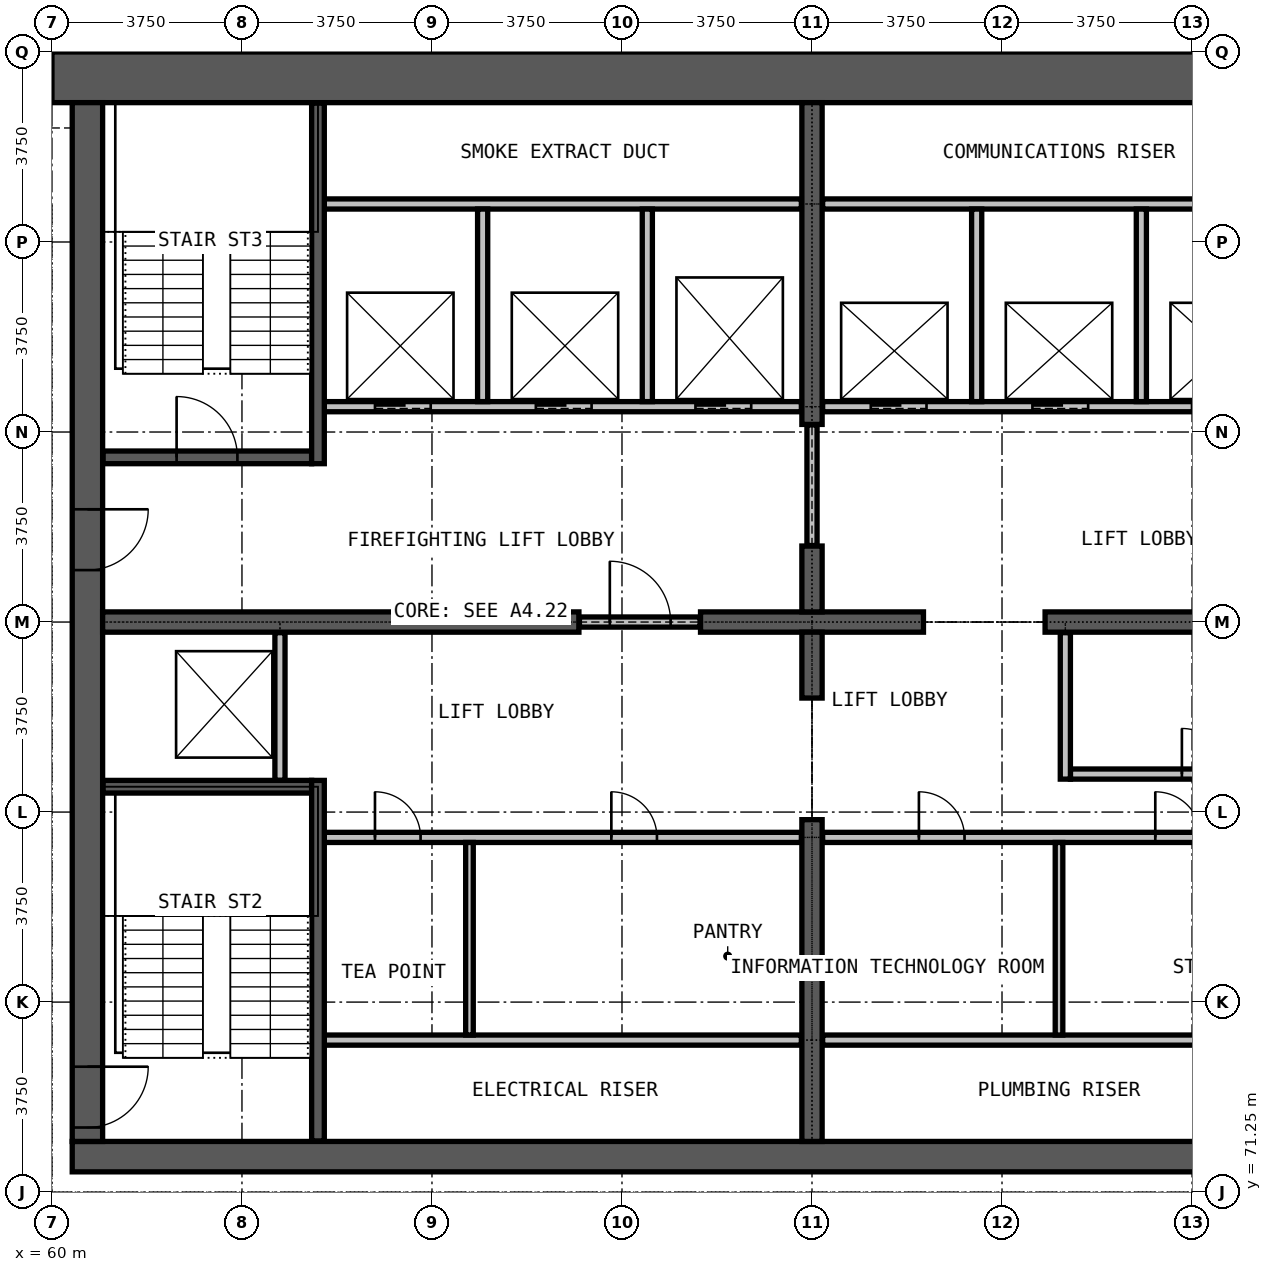
"""IFC4 building model, lengths in metres.
Left out: names, types, materials, properties, quantities, classifications, styles, units other than length and angle.
Written with IfcOpenShell. Run it as: python <this file> out.ifc"""

import sys

from ifc_helpers import new_model, si_unit, direction, frame, frame_2d, origin, place, context, subcontext, project, spatial, rectangle, extrude, element, fill, save


model = new_model("IFC4")
c1 = context("Model", 3, precision=1e-05, world=origin(), true_north=direction((0.0, 1.0)))
c2 = subcontext(c1, "Body", "Model", "MODEL_VIEW")
j1 = project(units=[si_unit("LENGTHUNIT", "METRE"), si_unit("PLANEANGLEUNIT", "RADIAN")], contexts=[c1])
p1 = place(None, origin())
s1 = spatial("IfcSite", under=j1, at=p1, CompositionType="ELEMENT")
p2 = place(p1, origin())
s2 = spatial("IfcBuilding", under=s1, at=p2, CompositionType="ELEMENT")
p3 = place(p2, frame((0.0, 0.0, 206.7)))
s3 = spatial("IfcBuildingStorey", under=s2, at=p3, CompositionType="ELEMENT", Elevation=206.7)
p4 = place(p3, frame((60.4, 71.95, 0.0), z_axis=(0.0, 0.0, 1.0), x_axis=(1.0, 0.0, 0.0)))
e1 = element("IfcWall", 1, at=p4, inside=s3, PredefinedType="SHEAR", context=c2, shape_type="SweptSolid", body=[
    extrude(rectangle(XDim=29.2, YDim=0.6, at=frame_2d((14.6, 0.0))), origin(), (0.0, 0.0, 1.0), 3.6),
])
p5 = place(p3, frame((90.0, 93.25, 0.0), z_axis=(0.0, 0.0, 1.0), x_axis=(-1.0, 0.0, 0.0)))
e2 = element("IfcWall", 2, at=p5, inside=s3, PredefinedType="SHEAR", context=c2, shape_type="SweptSolid", body=[
    extrude(rectangle(XDim=30.0, YDim=1.0, at=frame_2d((15.0, 0.0))), origin(), (0.0, 0.0, 1.0), 3.6),
])
p6 = place(p3, frame((60.7, 92.75, 0.0), z_axis=(0.0, 0.0, 1.0), x_axis=(0.0, -1.0, 0.0)))
e3 = element("IfcWall", 3, at=p6, inside=s3, PredefinedType="SHEAR", context=c2, shape_type="SweptSolid", body=[
    extrude(rectangle(XDim=20.5, YDim=0.6, at=frame_2d((10.25, 0.0))), origin(), (0.0, 0.0, 1.0), 3.6),
])
p7 = place(p6, frame((19.025, 0.0, 0.0)))
e4 = element("IfcOpeningElement", 4, at=p7, cuts=e3, PredefinedType="OPENING", context=c2, shape_type="SweptSolid", body=[
    extrude(rectangle(XDim=1.2, YDim=2.2, at=frame_2d((0.6, 1.1))), frame((0.0, 0.31, 0.0), z_axis=(0.0, -1.0, 0.0), x_axis=(1.0, 0.0, 0.0)), (0.0, 0.0, 1.0), 0.62),
])
p8 = place(p6, frame((8.025, 0.0, 0.0)))
e5 = element("IfcOpeningElement", 5, at=p8, cuts=e3, PredefinedType="OPENING", context=c2, shape_type="SweptSolid", body=[
    extrude(rectangle(XDim=1.2, YDim=2.2, at=frame_2d((0.6, 1.1))), frame((0.0, 0.31, 0.0), z_axis=(0.0, -1.0, 0.0), x_axis=(1.0, 0.0, 0.0)), (0.0, 0.0, 1.0), 0.62),
])
p9 = place(p3, frame((61.0, 82.5, 0.0), z_axis=(0.0, 0.0, 1.0), x_axis=(1.0, 0.0, 0.0)))
e6 = element("IfcWall", 6, at=p9, inside=s3, PredefinedType="SHEAR", context=c2, shape_type="SweptSolid", body=[
    extrude(rectangle(XDim=9.4, YDim=0.4, at=frame_2d((4.7, 0.0))), origin(), (0.0, 0.0, 1.0), 3.6),
])
p10 = place(p3, frame((72.8, 82.5, 0.0), z_axis=(0.0, 0.0, 1.0), x_axis=(1.0, 0.0, 0.0)))
e7 = element("IfcWall", 7, at=p10, inside=s3, PredefinedType="SHEAR", context=c2, shape_type="SweptSolid", body=[
    extrude(rectangle(XDim=4.4, YDim=0.4, at=frame_2d((2.2, 0.0))), origin(), (0.0, 0.0, 1.0), 3.6),
])
p11 = place(p3, frame((79.6, 82.5, 0.0), z_axis=(0.0, 0.0, 1.0), x_axis=(1.0, 0.0, 0.0)))
e8 = element("IfcWall", 8, at=p11, inside=s3, PredefinedType="SHEAR", context=c2, shape_type="SweptSolid", body=[
    extrude(rectangle(XDim=9.4, YDim=0.4, at=frame_2d((4.7, 0.0))), origin(), (0.0, 0.0, 1.0), 3.6),
])
p12 = place(p3, frame((75.0, 72.25, 0.0), z_axis=(0.0, 0.0, 1.0), x_axis=(0.0, 1.0, 0.0)))
e9 = element("IfcWall", 9, at=p12, inside=s3, PredefinedType="SHEAR", context=c2, shape_type="SweptSolid", body=[
    extrude(rectangle(XDim=6.35, YDim=0.4, at=frame_2d((3.175, 0.0))), origin(), (0.0, 0.0, 1.0), 3.6),
])
for number, where, z_axis, x_axis in (
    (10, (75.0, 81.0, 0.0), (0.0, 0.0, 1.0), (0.0, 1.0, 0.0)),
    (11, (75.0, 82.7, 0.0), (0.0, 0.0, 1.0), (0.0, 1.0, 0.0)),
):
    element("IfcWall", number, at=place(p3, frame(where, z_axis=z_axis, x_axis=x_axis)), inside=s3, PredefinedType="SHEAR", context=c2, shape_type="SweptSolid", body=[
        extrude(rectangle(XDim=1.3, YDim=0.4, at=frame_2d((0.65, 0.0))), origin(), (0.0, 0.0, 1.0), 3.6),
    ])
p13 = place(p3, frame((75.0, 86.4, 0.0), z_axis=(0.0, 0.0, 1.0), x_axis=(0.0, 1.0, 0.0)))
e12 = element("IfcWall", 12, at=p13, inside=s3, PredefinedType="SHEAR", context=c2, shape_type="SweptSolid", body=[
    extrude(rectangle(XDim=6.35, YDim=0.4, at=frame_2d((3.175, 0.0))), origin(), (0.0, 0.0, 1.0), 3.6),
])
for number, where, z_axis, x_axis in (
    (13, (65.375, 74.25, 0.0), (0.0, 0.0, 1.0), (1.0, 0.0, 0.0)),
    (14, (75.21, 74.25, 0.0), (0.0, 0.0, 1.0), (1.0, 0.0, 0.0)),
):
    element("IfcWall", number, at=place(p3, frame(where, z_axis=z_axis, x_axis=x_axis)), inside=s3, PredefinedType="PARTITIONING", context=c2, shape_type="SweptSolid", body=[
        extrude(rectangle(XDim=9.415, YDim=0.2, at=frame_2d((4.708, 0.0))), origin(), (0.0, 0.0, 1.0), 3.3),
    ])
p14 = place(p3, frame((65.375, 78.25, 0.0), z_axis=(0.0, 0.0, 1.0), x_axis=(1.0, 0.0, 0.0)))
e15 = element("IfcWall", 15, at=p14, inside=s3, PredefinedType="PARTITIONING", context=c2, shape_type="SweptSolid", body=[
    extrude(rectangle(XDim=9.415, YDim=0.2, at=frame_2d((4.708, 0.0))), origin(), (0.0, 0.0, 1.0), 3.3),
])
p15 = place(p14, frame((1.0, 0.0, 0.0)))
e16 = element("IfcOpeningElement", 16, at=p15, cuts=e15, PredefinedType="OPENING", context=c2, shape_type="SweptSolid", body=[
    extrude(rectangle(XDim=0.9, YDim=2.2, at=frame_2d((0.45, 1.1))), frame((0.0, 0.11, 0.0), z_axis=(0.0, -1.0, 0.0), x_axis=(1.0, 0.0, 0.0)), (0.0, 0.0, 1.0), 0.22),
])
p16 = place(p14, frame((5.665, 0.0, 0.0)))
e17 = element("IfcOpeningElement", 17, at=p16, cuts=e15, PredefinedType="OPENING", context=c2, shape_type="SweptSolid", body=[
    extrude(rectangle(XDim=0.9, YDim=2.2, at=frame_2d((0.45, 1.1))), frame((0.0, 0.11, 0.0), z_axis=(0.0, -1.0, 0.0), x_axis=(1.0, 0.0, 0.0)), (0.0, 0.0, 1.0), 0.22),
])
p17 = place(p3, frame((75.21, 78.25, 0.0), z_axis=(0.0, 0.0, 1.0), x_axis=(1.0, 0.0, 0.0)))
e18 = element("IfcWall", 18, at=p17, inside=s3, PredefinedType="PARTITIONING", context=c2, shape_type="SweptSolid", body=[
    extrude(rectangle(XDim=9.415, YDim=0.2, at=frame_2d((4.708, 0.0))), origin(), (0.0, 0.0, 1.0), 3.3),
])
p18 = place(p17, frame((1.9, 0.0, 0.0)))
e19 = element("IfcOpeningElement", 19, at=p18, cuts=e18, PredefinedType="OPENING", context=c2, shape_type="SweptSolid", body=[
    extrude(rectangle(XDim=0.9, YDim=2.2, at=frame_2d((0.45, 1.1))), frame((0.0, 0.11, 0.0), z_axis=(0.0, -1.0, 0.0), x_axis=(1.0, 0.0, 0.0)), (0.0, 0.0, 1.0), 0.22),
])
p19 = place(p17, frame((6.565, 0.0, 0.0)))
e20 = element("IfcOpeningElement", 20, at=p19, cuts=e18, PredefinedType="OPENING", context=c2, shape_type="SweptSolid", body=[
    extrude(rectangle(XDim=0.9, YDim=2.2, at=frame_2d((0.45, 1.1))), frame((0.0, 0.11, 0.0), z_axis=(0.0, -1.0, 0.0), x_axis=(1.0, 0.0, 0.0)), (0.0, 0.0, 1.0), 0.22),
])
p20 = place(p3, frame((80.1, 79.5, 0.0), z_axis=(0.0, 0.0, 1.0), x_axis=(1.0, 0.0, 0.0)))
e21 = element("IfcWall", 21, at=p20, inside=s3, PredefinedType="PARTITIONING", context=c2, shape_type="SweptSolid", body=[
    extrude(rectangle(XDim=5.3, YDim=0.2, at=frame_2d((2.65, 0.0))), origin(), (0.0, 0.0, 1.0), 3.3),
])
p21 = place(p20, frame((2.2, 0.0, 0.0)))
e22 = element("IfcOpeningElement", 22, at=p21, cuts=e21, PredefinedType="OPENING", context=c2, shape_type="SweptSolid", body=[
    extrude(rectangle(XDim=0.9, YDim=2.2, at=frame_2d((0.45, 1.1))), frame((0.0, 0.11, 0.0), z_axis=(0.0, -1.0, 0.0), x_axis=(1.0, 0.0, 0.0)), (0.0, 0.0, 1.0), 0.22),
])
p22 = place(p3, frame((70.41, 82.5, 0.0), z_axis=(0.0, 0.0, 1.0), x_axis=(1.0, 0.0, 0.0)))
e23 = element("IfcWall", 23, at=p22, inside=s3, PredefinedType="PARTITIONING", context=c2, shape_type="SweptSolid", body=[
    extrude(rectangle(XDim=2.38, YDim=0.2, at=frame_2d((1.19, 0.0))), origin(), (0.0, 0.0, 1.0), 2.4),
])
p23 = place(p22, frame((0.6, 0.0, 0.0)))
e24 = element("IfcOpeningElement", 24, at=p23, cuts=e23, PredefinedType="OPENING", context=c2, shape_type="SweptSolid", body=[
    extrude(rectangle(XDim=1.2, YDim=2.2, at=frame_2d((0.6, 1.1))), frame((0.0, 0.11, 0.0), z_axis=(0.0, -1.0, 0.0), x_axis=(1.0, 0.0, 0.0)), (0.0, 0.0, 1.0), 0.22),
])
p24 = place(p3, frame((75.0, 84.01, 0.0), z_axis=(0.0, 0.0, 1.0), x_axis=(0.0, 1.0, 0.0)))
e25 = element("IfcWall", 25, at=p24, inside=s3, PredefinedType="PARTITIONING", context=c2, shape_type="SweptSolid", body=[
    extrude(rectangle(XDim=2.38, YDim=0.2, at=frame_2d((1.19, 0.0))), origin(), (0.0, 0.0, 1.0), 2.4),
])
p25 = place(p3, frame((80.0, 79.4, 0.0), z_axis=(0.0, 0.0, 1.0), x_axis=(0.0, 1.0, 0.0)))
e26 = element("IfcWall", 26, at=p25, inside=s3, PredefinedType="PARTITIONING", context=c2, shape_type="SweptSolid", body=[
    extrude(rectangle(XDim=2.89, YDim=0.2, at=frame_2d((1.445, 0.0))), origin(), (0.0, 0.0, 1.0), 3.3),
])
for number, where, z_axis, x_axis in (
    (27, (68.24, 74.35, 0.0), (0.0, 0.0, 1.0), (0.0, 1.0, 0.0)),
    (28, (79.875, 74.35, 0.0), (0.0, 0.0, 1.0), (0.0, 1.0, 0.0)),
):
    element("IfcWall", number, at=place(p3, frame(where, z_axis=z_axis, x_axis=x_axis)), inside=s3, PredefinedType="PARTITIONING", context=c2, shape_type="SweptSolid", body=[
        extrude(rectangle(XDim=3.8, YDim=0.15, at=frame_2d((1.9, 0.0))), origin(), (0.0, 0.0, 1.0), 3.3),
    ])
p26 = place(p3, frame((65.375, 86.75, 0.0), z_axis=(0.0, 0.0, 1.0), x_axis=(1.0, 0.0, 0.0)))
e29 = element("IfcWall", 29, at=p26, inside=s3, PredefinedType="PARTITIONING", context=c2, shape_type="SweptSolid", body=[
    extrude(rectangle(XDim=9.415, YDim=0.2, at=frame_2d((4.708, 0.0))), origin(), (0.0, 0.0, 1.0), 3.3),
])
p27 = place(p26, frame((1.0, 0.0, 0.0)))
e30 = element("IfcOpeningElement", 30, at=p27, cuts=e29, PredefinedType="OPENING", context=c2, shape_type="SweptSolid", body=[
    extrude(rectangle(XDim=1.1, YDim=2.2, at=frame_2d((0.55, 1.1))), frame((0.0, 0.11, 0.0), z_axis=(0.0, -1.0, 0.0), x_axis=(1.0, 0.0, 0.0)), (0.0, 0.0, 1.0), 0.22),
])
p28 = place(p26, frame((4.175, 0.0, 0.0)))
e31 = element("IfcOpeningElement", 31, at=p28, cuts=e29, PredefinedType="OPENING", context=c2, shape_type="SweptSolid", body=[
    extrude(rectangle(XDim=1.1, YDim=2.2, at=frame_2d((0.55, 1.1))), frame((0.0, 0.11, 0.0), z_axis=(0.0, -1.0, 0.0), x_axis=(1.0, 0.0, 0.0)), (0.0, 0.0, 1.0), 0.22),
])
p29 = place(p26, frame((7.325, 0.0, 0.0)))
e32 = element("IfcOpeningElement", 32, at=p29, cuts=e29, PredefinedType="OPENING", context=c2, shape_type="SweptSolid", body=[
    extrude(rectangle(XDim=1.1, YDim=2.2, at=frame_2d((0.55, 1.1))), frame((0.0, 0.11, 0.0), z_axis=(0.0, -1.0, 0.0), x_axis=(1.0, 0.0, 0.0)), (0.0, 0.0, 1.0), 0.22),
])
p30 = place(p3, frame((75.21, 86.75, 0.0), z_axis=(0.0, 0.0, 1.0), x_axis=(1.0, 0.0, 0.0)))
e33 = element("IfcWall", 33, at=p30, inside=s3, PredefinedType="PARTITIONING", context=c2, shape_type="SweptSolid", body=[
    extrude(rectangle(XDim=9.415, YDim=0.2, at=frame_2d((4.708, 0.0))), origin(), (0.0, 0.0, 1.0), 3.3),
])
p31 = place(p30, frame((0.95, 0.0, 0.0)))
e34 = element("IfcOpeningElement", 34, at=p31, cuts=e33, PredefinedType="OPENING", context=c2, shape_type="SweptSolid", body=[
    extrude(rectangle(XDim=1.1, YDim=2.2, at=frame_2d((0.55, 1.1))), frame((0.0, 0.11, 0.0), z_axis=(0.0, -1.0, 0.0), x_axis=(1.0, 0.0, 0.0)), (0.0, 0.0, 1.0), 0.22),
])
p32 = place(p30, frame((4.14, 0.0, 0.0)))
e35 = element("IfcOpeningElement", 35, at=p32, cuts=e33, PredefinedType="OPENING", context=c2, shape_type="SweptSolid", body=[
    extrude(rectangle(XDim=1.1, YDim=2.2, at=frame_2d((0.55, 1.1))), frame((0.0, 0.11, 0.0), z_axis=(0.0, -1.0, 0.0), x_axis=(1.0, 0.0, 0.0)), (0.0, 0.0, 1.0), 0.22),
])
p33 = place(p30, frame((7.29, 0.0, 0.0)))
e36 = element("IfcOpeningElement", 36, at=p33, cuts=e33, PredefinedType="OPENING", context=c2, shape_type="SweptSolid", body=[
    extrude(rectangle(XDim=1.1, YDim=2.2, at=frame_2d((0.55, 1.1))), frame((0.0, 0.11, 0.0), z_axis=(0.0, -1.0, 0.0), x_axis=(1.0, 0.0, 0.0)), (0.0, 0.0, 1.0), 0.22),
])
for number, where, z_axis, x_axis in (
    (37, (65.375, 90.75, 0.0), (0.0, 0.0, 1.0), (1.0, 0.0, 0.0)),
    (38, (75.21, 90.75, 0.0), (0.0, 0.0, 1.0), (1.0, 0.0, 0.0)),
):
    element("IfcWall", number, at=place(p3, frame(where, z_axis=z_axis, x_axis=x_axis)), inside=s3, PredefinedType="PARTITIONING", context=c2, shape_type="SweptSolid", body=[
        extrude(rectangle(XDim=9.415, YDim=0.2, at=frame_2d((4.708, 0.0))), origin(), (0.0, 0.0, 1.0), 3.3),
    ])
p34 = place(p3, frame((64.5, 79.375, 0.0), z_axis=(0.0, 0.0, 1.0), x_axis=(0.0, 1.0, 0.0)))
e39 = element("IfcWall", 39, at=p34, inside=s3, PredefinedType="PARTITIONING", context=c2, shape_type="SweptSolid", body=[
    extrude(rectangle(XDim=2.915, YDim=0.2, at=frame_2d((1.458, 0.0))), origin(), (0.0, 0.0, 1.0), 3.3),
])
for number, where, z_axis, x_axis in (
    (40, (68.5, 86.85, 0.0), (0.0, 0.0, 1.0), (0.0, 1.0, 0.0)),
    (41, (71.75, 86.85, 0.0), (0.0, 0.0, 1.0), (0.0, 1.0, 0.0)),
    (42, (78.25, 86.85, 0.0), (0.0, 0.0, 1.0), (0.0, 1.0, 0.0)),
    (43, (81.5, 86.85, 0.0), (0.0, 0.0, 1.0), (0.0, 1.0, 0.0)),
):
    element("IfcWall", number, at=place(p3, frame(where, z_axis=z_axis, x_axis=x_axis)), inside=s3, PredefinedType="PARTITIONING", context=c2, shape_type="SweptSolid", body=[
        extrude(rectangle(XDim=3.8, YDim=0.2, at=frame_2d((1.9, 0.0))), origin(), (0.0, 0.0, 1.0), 3.3),
    ])
p35 = place(p3, frame((61.01, 79.25, 0.0), z_axis=(0.0, 0.0, 1.0), x_axis=(1.0, 0.0, 0.0)))
e44 = element("IfcWall", 44, at=p35, inside=s3, PredefinedType="PARTITIONING", context=c2, shape_type="SweptSolid", body=[
    extrude(rectangle(XDim=4.115, YDim=0.25, at=frame_2d((2.058, 0.0))), origin(), (0.0, 0.0, 1.0), 3.3),
])
p36 = place(p3, frame((61.01, 85.75, 0.0), z_axis=(0.0, 0.0, 1.0), x_axis=(1.0, 0.0, 0.0)))
e45 = element("IfcWall", 45, at=p36, inside=s3, PredefinedType="PARTITIONING", context=c2, shape_type="SweptSolid", body=[
    extrude(rectangle(XDim=4.115, YDim=0.25, at=frame_2d((2.058, 0.0))), origin(), (0.0, 0.0, 1.0), 3.3),
])
p37 = place(p36, frame((1.45, 0.0, 0.0)))
e46 = element("IfcOpeningElement", 46, at=p37, cuts=e45, PredefinedType="OPENING", context=c2, shape_type="SweptSolid", body=[
    extrude(rectangle(XDim=1.2, YDim=2.2, at=frame_2d((0.6, 1.1))), frame((0.0, 0.135, 0.0), z_axis=(0.0, -1.0, 0.0), x_axis=(1.0, 0.0, 0.0)), (0.0, 0.0, 1.0), 0.27),
])
for number, where, z_axis, x_axis in (
    (47, (65.25, 72.26, 0.0), (0.0, 0.0, 1.0), (0.0, 1.0, 0.0)),
    (48, (65.25, 85.625, 0.0), (0.0, 0.0, 1.0), (0.0, 1.0, 0.0)),
):
    element("IfcWall", number, at=place(p3, frame(where, z_axis=z_axis, x_axis=x_axis)), inside=s3, PredefinedType="PARTITIONING", context=c2, shape_type="SweptSolid", body=[
        extrude(rectangle(XDim=7.115, YDim=0.25, at=frame_2d((3.558, 0.0))), origin(), (0.0, 0.0, 1.0), 3.3),
    ])
p38 = place(p31, origin())
e49 = element("IfcDoor", 49, at=p38, inside=s3, OperationType="DOUBLE_DOOR_SLIDING", PredefinedType="DOOR", context=c2, shape_type="SweptSolid", body=[
    extrude(rectangle(XDim=1.1, YDim=2.2, at=frame_2d((0.55, 1.1))), frame((0.0, 0.025, 0.0), z_axis=(0.0, -1.0, 0.0), x_axis=(1.0, 0.0, 0.0)), (0.0, 0.0, 1.0), 0.05),
])
fill(e34, e49)
p39 = place(p32, origin())
e50 = element("IfcDoor", 50, at=p39, inside=s3, OperationType="DOUBLE_DOOR_SLIDING", PredefinedType="DOOR", context=c2, shape_type="SweptSolid", body=[
    extrude(rectangle(XDim=1.1, YDim=2.2, at=frame_2d((0.55, 1.1))), frame((0.0, 0.025, 0.0), z_axis=(0.0, -1.0, 0.0), x_axis=(1.0, 0.0, 0.0)), (0.0, 0.0, 1.0), 0.05),
])
fill(e35, e50)
p40 = place(p27, origin())
e51 = element("IfcDoor", 51, at=p40, inside=s3, OperationType="DOUBLE_DOOR_SLIDING", PredefinedType="DOOR", context=c2, shape_type="SweptSolid", body=[
    extrude(rectangle(XDim=1.1, YDim=2.2, at=frame_2d((0.55, 1.1))), frame((0.0, 0.025, 0.0), z_axis=(0.0, -1.0, 0.0), x_axis=(1.0, 0.0, 0.0)), (0.0, 0.0, 1.0), 0.05),
])
fill(e30, e51)
p41 = place(p28, origin())
e52 = element("IfcDoor", 52, at=p41, inside=s3, OperationType="DOUBLE_DOOR_SLIDING", PredefinedType="DOOR", context=c2, shape_type="SweptSolid", body=[
    extrude(rectangle(XDim=1.1, YDim=2.2, at=frame_2d((0.55, 1.1))), frame((0.0, 0.025, 0.0), z_axis=(0.0, -1.0, 0.0), x_axis=(1.0, 0.0, 0.0)), (0.0, 0.0, 1.0), 0.05),
])
fill(e31, e52)
p42 = place(p29, origin())
e53 = element("IfcDoor", 53, at=p42, inside=s3, OperationType="DOUBLE_DOOR_SLIDING", PredefinedType="DOOR", context=c2, shape_type="SweptSolid", body=[
    extrude(rectangle(XDim=1.1, YDim=2.2, at=frame_2d((0.55, 1.1))), frame((0.0, 0.025, 0.0), z_axis=(0.0, -1.0, 0.0), x_axis=(1.0, 0.0, 0.0)), (0.0, 0.0, 1.0), 0.05),
])
fill(e32, e53)
p43 = place(p23, origin())
e54 = element("IfcDoor", 54, at=p43, inside=s3, OperationType="SINGLE_SWING_RIGHT", PredefinedType="DOOR", context=c2, shape_type="SweptSolid", body=[
    extrude(rectangle(XDim=1.2, YDim=2.2, at=frame_2d((0.6, 1.1))), frame((0.0, 0.025, 0.0), z_axis=(0.0, -1.0, 0.0), x_axis=(1.0, 0.0, 0.0)), (0.0, 0.0, 1.0), 0.05),
])
fill(e24, e54)
p44 = place(p37, origin())
e55 = element("IfcDoor", 55, at=p44, inside=s3, OperationType="SINGLE_SWING_LEFT", PredefinedType="DOOR", context=c2, shape_type="SweptSolid", body=[
    extrude(rectangle(XDim=1.2, YDim=2.2, at=frame_2d((0.6, 1.1))), frame((0.0, 0.025, 0.0), z_axis=(0.0, -1.0, 0.0), x_axis=(1.0, 0.0, 0.0)), (0.0, 0.0, 1.0), 0.05),
])
fill(e46, e55)
p45 = place(p7, origin())
e56 = element("IfcDoor", 56, at=p45, inside=s3, OperationType="SINGLE_SWING_LEFT", PredefinedType="DOOR", context=c2, shape_type="SweptSolid", body=[
    extrude(rectangle(XDim=1.2, YDim=2.2, at=frame_2d((0.6, 1.1))), frame((0.0, 0.025, 0.0), z_axis=(0.0, -1.0, 0.0), x_axis=(1.0, 0.0, 0.0)), (0.0, 0.0, 1.0), 0.05),
])
fill(e4, e56)
p46 = place(p21, origin())
e57 = element("IfcDoor", 57, at=p46, inside=s3, OperationType="SINGLE_SWING_RIGHT", PredefinedType="DOOR", context=c2, shape_type="SweptSolid", body=[
    extrude(rectangle(XDim=0.9, YDim=2.2, at=frame_2d((0.45, 1.1))), frame((0.0, 0.025, 0.0), z_axis=(0.0, -1.0, 0.0), x_axis=(1.0, 0.0, 0.0)), (0.0, 0.0, 1.0), 0.05),
])
fill(e22, e57)
p47 = place(p8, origin())
e58 = element("IfcDoor", 58, at=p47, inside=s3, OperationType="SINGLE_SWING_RIGHT", PredefinedType="DOOR", context=c2, shape_type="SweptSolid", body=[
    extrude(rectangle(XDim=1.2, YDim=2.2, at=frame_2d((0.6, 1.1))), frame((0.0, 0.025, 0.0), z_axis=(0.0, -1.0, 0.0), x_axis=(1.0, 0.0, 0.0)), (0.0, 0.0, 1.0), 0.05),
])
fill(e5, e58)
p48 = place(p15, origin())
e59 = element("IfcDoor", 59, at=p48, inside=s3, OperationType="SINGLE_SWING_LEFT", PredefinedType="DOOR", context=c2, shape_type="SweptSolid", body=[
    extrude(rectangle(XDim=0.9, YDim=2.2, at=frame_2d((0.45, 1.1))), frame((0.0, 0.025, 0.0), z_axis=(0.0, -1.0, 0.0), x_axis=(1.0, 0.0, 0.0)), (0.0, 0.0, 1.0), 0.05),
])
fill(e16, e59)
p49 = place(p16, origin())
e60 = element("IfcDoor", 60, at=p49, inside=s3, OperationType="SINGLE_SWING_LEFT", PredefinedType="DOOR", context=c2, shape_type="SweptSolid", body=[
    extrude(rectangle(XDim=0.9, YDim=2.2, at=frame_2d((0.45, 1.1))), frame((0.0, 0.025, 0.0), z_axis=(0.0, -1.0, 0.0), x_axis=(1.0, 0.0, 0.0)), (0.0, 0.0, 1.0), 0.05),
])
fill(e17, e60)
p50 = place(p18, origin())
e61 = element("IfcDoor", 61, at=p50, inside=s3, OperationType="SINGLE_SWING_LEFT", PredefinedType="DOOR", context=c2, shape_type="SweptSolid", body=[
    extrude(rectangle(XDim=0.9, YDim=2.2, at=frame_2d((0.45, 1.1))), frame((0.0, 0.025, 0.0), z_axis=(0.0, -1.0, 0.0), x_axis=(1.0, 0.0, 0.0)), (0.0, 0.0, 1.0), 0.05),
])
fill(e19, e61)
p51 = place(p19, origin())
e62 = element("IfcDoor", 62, at=p51, inside=s3, OperationType="SINGLE_SWING_RIGHT", PredefinedType="DOOR", context=c2, shape_type="SweptSolid", body=[
    extrude(rectangle(XDim=0.9, YDim=2.2, at=frame_2d((0.45, 1.1))), frame((0.0, 0.025, 0.0), z_axis=(0.0, -1.0, 0.0), x_axis=(1.0, 0.0, 0.0)), (0.0, 0.0, 1.0), 0.05),
])
fill(e20, e62)
save(model, sys.argv[1])
